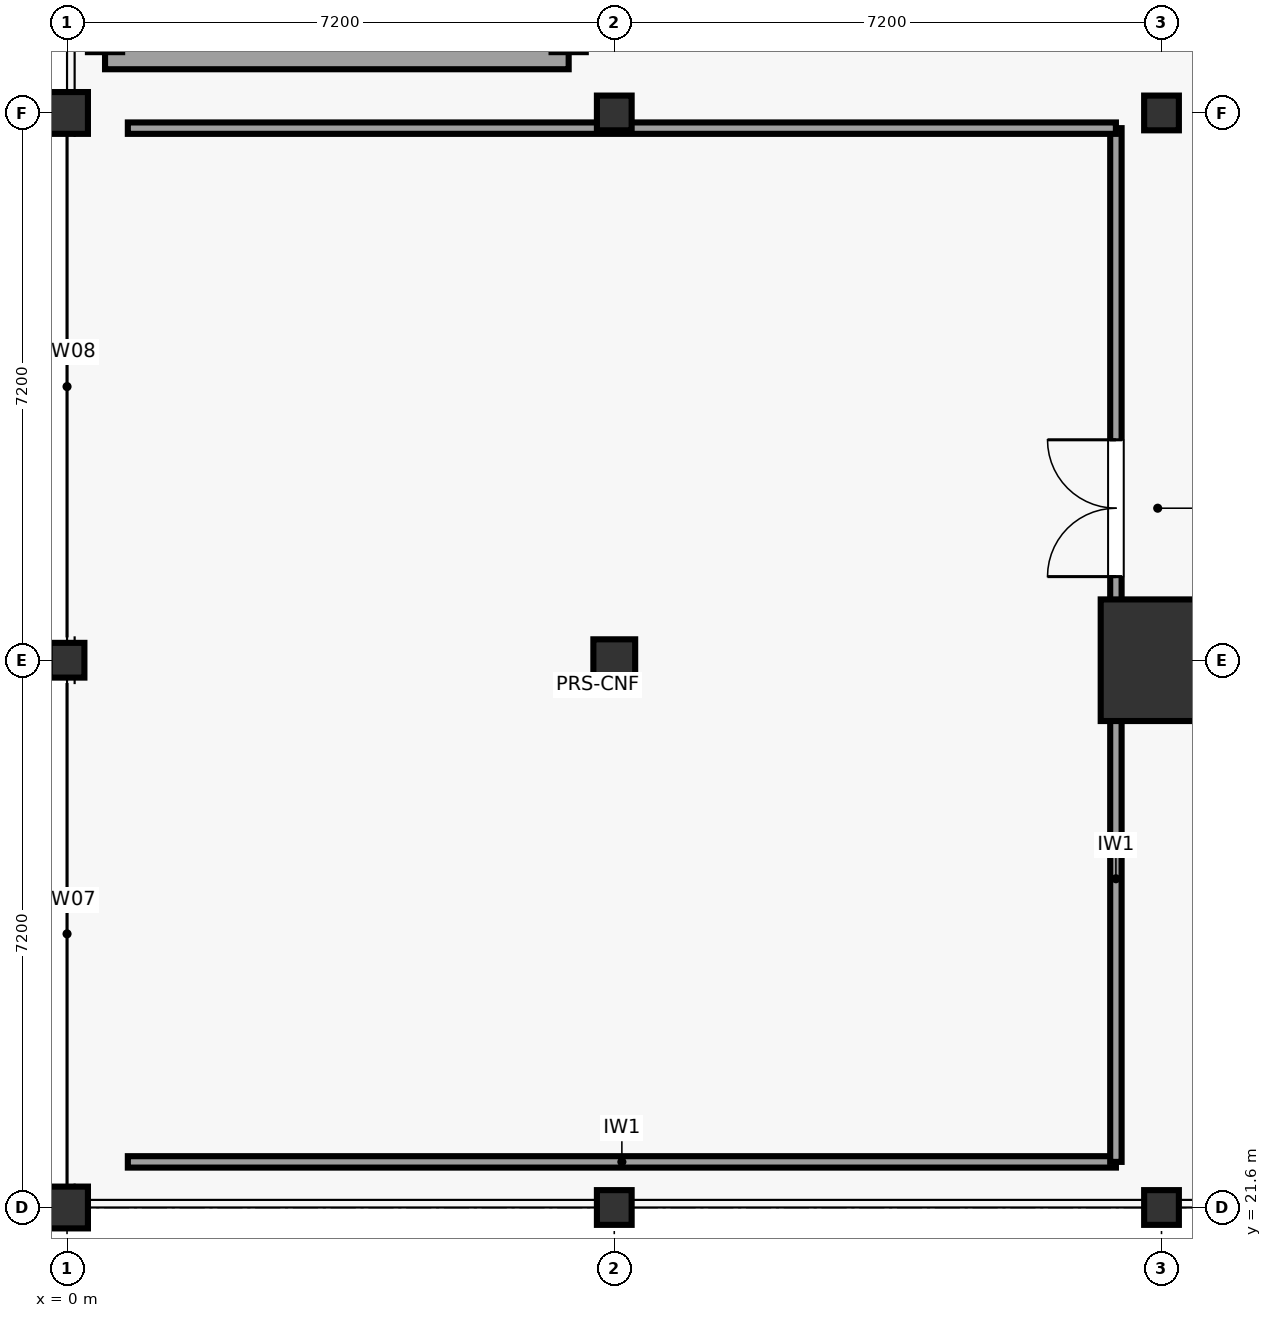
"""IFC4 building model, lengths in metres.
Left out: names, types, materials, properties, quantities, classifications, styles, units other than length and angle.
Written with IfcOpenShell. Run it as: python <this file> out.ifc"""

import sys

from ifc_helpers import new_model, si_unit, direction, frame, frame_2d, origin, origin_2d, place, context, subcontext, project, spatial, rectangle, circle, hollow_circle, extrude, element, fill, save


model = new_model("IFC4")
c1 = context("Model", 3, precision=1e-05, world=origin(), true_north=direction((0.0, 1.0)))
c2 = subcontext(c1, "Body", "Model", "MODEL_VIEW")
j1 = project(units=[si_unit("LENGTHUNIT", "METRE"), si_unit("PLANEANGLEUNIT", "RADIAN")], contexts=[c1])
p1 = place(None, origin())
s1 = spatial("IfcSite", under=j1, at=p1, CompositionType="ELEMENT")
p2 = place(p1, origin())
s2 = spatial("IfcBuilding", under=s1, at=p2, CompositionType="ELEMENT")
p3 = place(p2, frame((0.0, 0.0, 18.6)))
s3 = spatial("IfcBuildingStorey", under=s2, at=p3, CompositionType="ELEMENT", Elevation=18.6)
p4 = place(p3, frame((0.0, 21.6, 0.0), z_axis=(0.0, 0.0, 1.0), x_axis=(1.0, 0.0, 0.0)))
e1 = element("IfcColumn", 1, at=p4, inside=s3, PredefinedType="COLUMN", context=c2, shape_type="SweptSolid", body=[
    extrude(rectangle(XDim=0.55, YDim=0.55, at=origin_2d()), origin(), (0.0, 0.0, 1.0), 4.4),
])
p5 = place(p3, frame((0.0, 28.8, 0.0), z_axis=(0.0, 0.0, 1.0), x_axis=(1.0, 0.0, 0.0)))
e2 = element("IfcColumn", 2, at=p5, inside=s3, PredefinedType="COLUMN", context=c2, shape_type="SweptSolid", body=[
    extrude(hollow_circle(Radius=0.229, WallThickness=0.02, at=origin_2d()), origin(), (0.0, 0.0, 1.0), 4.4),
])
p6 = place(p3, frame((0.0, 36.0, 0.0), z_axis=(0.0, 0.0, 1.0), x_axis=(1.0, 0.0, 0.0)))
e3 = element("IfcColumn", 3, at=p6, inside=s3, PredefinedType="COLUMN", context=c2, shape_type="SweptSolid", body=[
    extrude(rectangle(XDim=0.55, YDim=0.55, at=origin_2d()), origin(), (0.0, 0.0, 1.0), 4.4),
])
p7 = place(p3, frame((7.2, 21.6, 0.0), z_axis=(0.0, 0.0, 1.0), x_axis=(1.0, 0.0, 0.0)))
e4 = element("IfcColumn", 4, at=p7, inside=s3, PredefinedType="COLUMN", context=c2, shape_type="SweptSolid", body=[
    extrude(hollow_circle(Radius=0.229, WallThickness=0.02, at=origin_2d()), origin(), (0.0, 0.0, 1.0), 4.4),
])
p8 = place(p3, frame((7.2, 28.8, 0.0), z_axis=(0.0, 0.0, 1.0), x_axis=(1.0, 0.0, 0.0)))
e5 = element("IfcColumn", 5, at=p8, inside=s3, PredefinedType="COLUMN", context=c2, shape_type="SweptSolid", body=[
    extrude(rectangle(XDim=0.55, YDim=0.55, at=origin_2d()), origin(), (0.0, 0.0, 1.0), 4.4),
])
for number, where, z_axis, x_axis in (
    (6, (7.2, 36.0, 0.0), (0.0, 0.0, 1.0), (1.0, 0.0, 0.0)),
    (7, (14.4, 21.6, 0.0), (0.0, 0.0, 1.0), (1.0, 0.0, 0.0)),
):
    element("IfcColumn", number, at=place(p3, frame(where, z_axis=z_axis, x_axis=x_axis)), inside=s3, PredefinedType="COLUMN", context=c2, shape_type="SweptSolid", body=[
        extrude(hollow_circle(Radius=0.229, WallThickness=0.02, at=origin_2d()), origin(), (0.0, 0.0, 1.0), 4.4),
    ])
p9 = place(p3, frame((14.4, 28.8, 0.0), z_axis=(0.0, 0.0, 1.0), x_axis=(1.0, 0.0, 0.0)))
e8 = element("IfcColumn", 8, at=p9, inside=s3, PredefinedType="COLUMN", context=c2, shape_type="SweptSolid", body=[
    extrude(circle(Radius=0.8, at=origin_2d()), origin(), (0.0, 0.0, 1.0), 4.4),
])
p10 = place(p3, frame((14.4, 36.0, 0.0), z_axis=(0.0, 0.0, 1.0), x_axis=(1.0, 0.0, 0.0)))
e9 = element("IfcColumn", 9, at=p10, inside=s3, PredefinedType="COLUMN", context=c2, shape_type="SweptSolid", body=[
    extrude(hollow_circle(Radius=0.229, WallThickness=0.02, at=origin_2d()), origin(), (0.0, 0.0, 1.0), 4.4),
])
p11 = place(p3, frame((0.5, 36.8, 0.0), z_axis=(0.0, 0.0, 1.0), x_axis=(1.0, 0.0, 0.0)))
e10 = element("IfcWall", 10, at=p11, inside=s3, PredefinedType="SHEAR", context=c2, shape_type="SweptSolid", body=[
    extrude(rectangle(XDim=6.1, YDim=0.45, at=frame_2d((3.05, 0.0))), origin(), (0.0, 0.0, 1.0), 4.15),
])
p12 = place(p3, frame((0.5, 36.8, 0.0), z_axis=(0.0, 0.0, 1.0), x_axis=(0.0, 1.0, 0.0)))
e11 = element("IfcWall", 11, at=p12, inside=s3, PredefinedType="SHEAR", context=c2, shape_type="SweptSolid", body=[
    extrude(rectangle(XDim=12.8, YDim=0.45, at=frame_2d((6.4, 0.0))), origin(), (0.0, 0.0, 1.0), 4.15),
])
p13 = place(p3, frame((6.6, 36.8, 0.0), z_axis=(0.0, 0.0, 1.0), x_axis=(0.0, 1.0, 0.0)))
e12 = element("IfcWall", 12, at=p13, inside=s3, PredefinedType="SHEAR", context=c2, shape_type="SweptSolid", body=[
    extrude(rectangle(XDim=12.8, YDim=0.45, at=frame_2d((6.4, 0.0))), origin(), (0.0, 0.0, 1.0), 4.15),
])
p14 = place(p13, frame((0.55, 0.0, 0.0)))
e13 = element("IfcOpeningElement", 13, at=p14, cuts=e12, PredefinedType="OPENING", context=c2, shape_type="SweptSolid", body=[
    extrude(rectangle(XDim=1.2, YDim=2.25, at=frame_2d((0.6, 1.125))), frame((0.0, 0.235, 0.0), z_axis=(0.0, -1.0, 0.0), x_axis=(1.0, 0.0, 0.0)), (0.0, 0.0, 1.0), 0.47),
])
p15 = place(p13, frame((10.458, 0.0, 0.0)))
e14 = element("IfcOpeningElement", 14, at=p15, cuts=e12, PredefinedType="OPENING", context=c2, shape_type="SweptSolid", body=[
    extrude(rectangle(XDim=1.1, YDim=2.2, at=frame_2d((0.55, 1.1))), frame((0.0, 0.235, 0.0), z_axis=(0.0, -1.0, 0.0), x_axis=(1.0, 0.0, 0.0)), (0.0, 0.0, 1.0), 0.47),
])
p16 = place(p3, frame((0.8, 22.2, 0.0), z_axis=(0.0, 0.0, 1.0), x_axis=(1.0, 0.0, 0.0)))
e15 = element("IfcWall", 15, at=p16, inside=s3, PredefinedType="PARTITIONING", context=c2, shape_type="SweptSolid", body=[
    extrude(rectangle(XDim=13.0, YDim=0.15, at=frame_2d((6.5, 0.0))), origin(), (0.0, 0.0, 1.0), 3.21),
])
p17 = place(p3, frame((13.8, 22.2, 0.0), z_axis=(0.0, 0.0, 1.0), x_axis=(0.0, 1.0, 0.0)))
e16 = element("IfcWall", 16, at=p17, inside=s3, PredefinedType="PARTITIONING", context=c2, shape_type="SweptSolid", body=[
    extrude(rectangle(XDim=13.6, YDim=0.15, at=frame_2d((6.8, 0.0))), origin(), (0.0, 0.0, 1.0), 3.21),
])
p18 = place(p17, frame((7.7, 0.0, 0.0)))
e17 = element("IfcOpeningElement", 17, at=p18, cuts=e16, PredefinedType="OPENING", context=c2, shape_type="SweptSolid", body=[
    extrude(rectangle(XDim=1.8, YDim=2.3, at=frame_2d((0.9, 1.15))), frame((0.0, 0.085, 0.0), z_axis=(0.0, -1.0, 0.0), x_axis=(1.0, 0.0, 0.0)), (0.0, 0.0, 1.0), 0.17),
])
p19 = place(p3, frame((13.8, 35.8, 0.0), z_axis=(0.0, 0.0, 1.0), x_axis=(-1.0, 0.0, 0.0)))
e18 = element("IfcWall", 18, at=p19, inside=s3, PredefinedType="PARTITIONING", context=c2, shape_type="SweptSolid", body=[
    extrude(rectangle(XDim=13.0, YDim=0.15, at=frame_2d((6.5, 0.0))), origin(), (0.0, 0.0, 1.0), 3.21),
])
p20 = place(p18, origin())
e19 = element("IfcDoor", 19, at=p20, inside=s3, OperationType="DOUBLE_DOOR_SINGLE_SWING", PredefinedType="DOOR", context=c2, shape_type="SweptSolid", body=[
    extrude(rectangle(XDim=1.8, YDim=2.3, at=frame_2d((0.9, 1.15))), frame((0.0, 0.025, 0.0), z_axis=(0.0, -1.0, 0.0), x_axis=(1.0, 0.0, 0.0)), (0.0, 0.0, 1.0), 0.05),
])
fill(e17, e19)
save(model, sys.argv[1])
